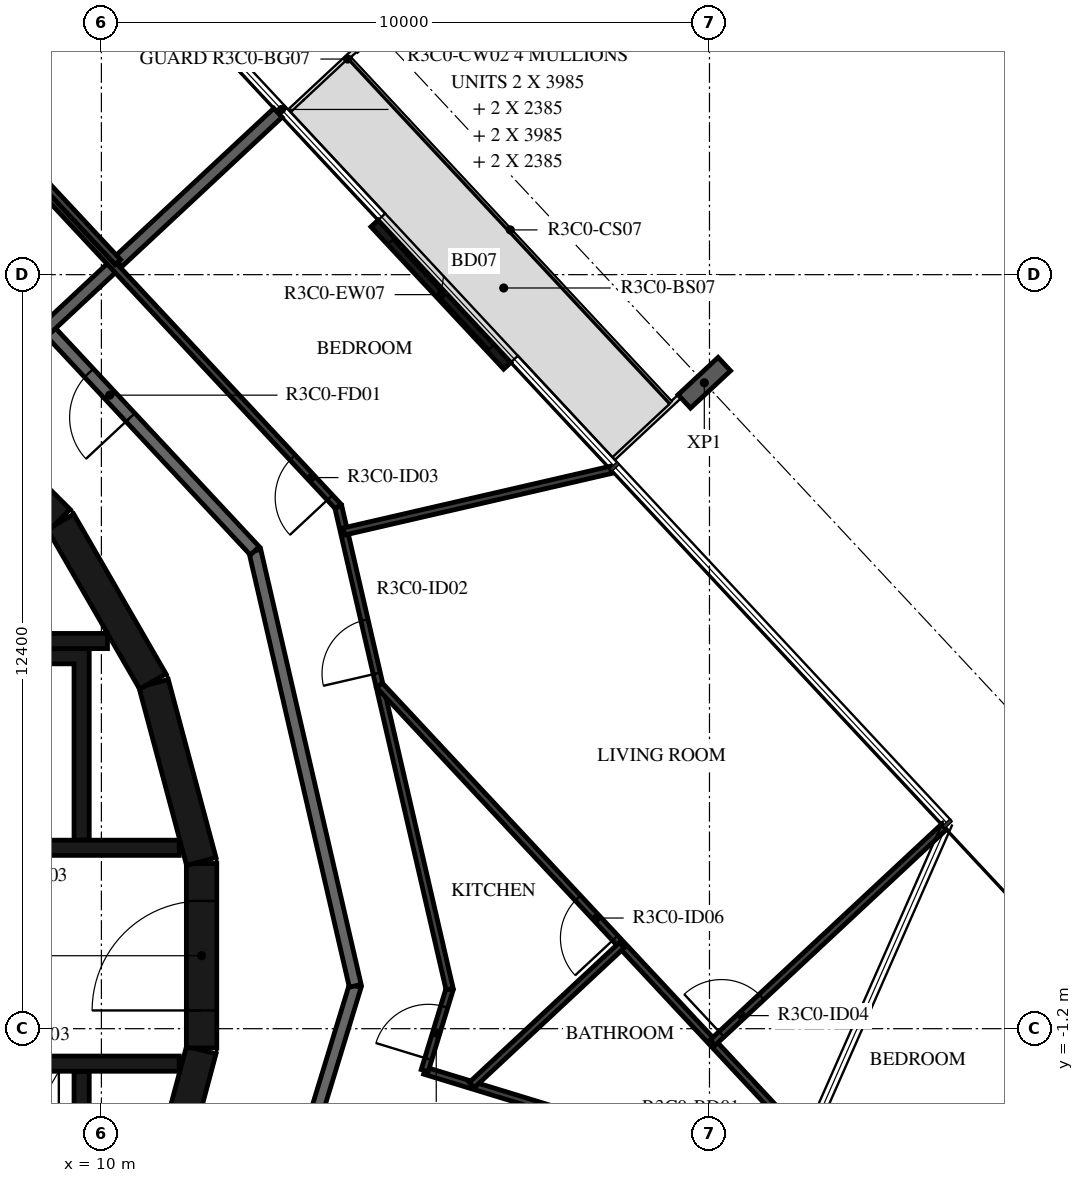
"""IFC4 building model, lengths in metres.
Left out: names, types, materials, properties, quantities, classifications, styles, units other than length and angle.
Written with IfcOpenShell. Run it as: python <this file> out.ifc"""

import sys

from ifc_helpers import new_model, si_unit, direction, frame, frame_2d, origin, origin_2d, place, context, subcontext, project, spatial, polyline, rectangle, i_section, outline, extrude, element, fill, save


model = new_model("IFC4")
c1 = context("Model", 3, precision=1e-05, world=origin(), true_north=direction((0.0, 1.0)))
c2 = subcontext(c1, "Body", "Model", "MODEL_VIEW")
j1 = project(units=[si_unit("LENGTHUNIT", "METRE"), si_unit("PLANEANGLEUNIT", "RADIAN")], contexts=[c1])
p1 = place(None, origin())
s1 = spatial("IfcSite", under=j1, at=p1, CompositionType="ELEMENT")
p2 = place(p1, origin())
s2 = spatial("IfcBuilding", under=s1, at=p2, CompositionType="ELEMENT")
p3 = place(p2, frame((0.0, 0.0, 141.4)))
s3 = spatial("IfcBuildingStorey", under=s2, at=p3, CompositionType="ELEMENT", Elevation=141.4)
p4 = place(p3, frame((19.915, 9.422, -0.38), z_axis=(0.0, 0.0, 1.0), x_axis=(0.68199801865, -0.731354019992, 0.0)))
e1 = element("IfcColumn", 1, at=p4, inside=s3, PredefinedType="COLUMN", context=c2, shape_type="SweptSolid", body=[
    extrude(i_section(OverallWidth=0.3, OverallDepth=0.9, WebThickness=0.019, FlangeThickness=0.035, FilletRadius=0.03, at=origin_2d()), origin(), (0.0, 0.0, 1.0), 2.616),
])
p5 = place(p3, frame((16.674, 9.701, 0.0), z_axis=(0.0, 0.0, 1.0), x_axis=(-0.681994703002, 0.731357111866, 0.0)))
e2 = element("IfcWall", 2, at=p5, inside=s3, PredefinedType="STANDARD", context=c2, shape_type="SweptSolid", body=[
    extrude(rectangle(XDim=3.2, YDim=0.16, at=frame_2d((1.6, 0.0))), origin(), (0.0, 0.0, 1.0), 3.05),
])
p6 = place(p5, frame((0.4, 0.0, 0.0)))
e3 = element("IfcOpeningElement", 3, at=p6, cuts=e2, PredefinedType="OPENING", context=c2, shape_type="SweptSolid", body=[
    extrude(rectangle(XDim=2.4, YDim=2.4, at=frame_2d((1.2, 1.2))), frame((0.0, 0.09, 0.0), z_axis=(0.0, -1.0, 0.0), x_axis=(1.0, 0.0, 0.0)), (0.0, 0.0, 1.0), 0.18),
])
p7 = place(p3, frame((10.858, -4.479, 0.0), z_axis=(0.0, 0.0, 1.0), x_axis=(0.258734743916, 0.965948410781, 0.0)))
e4 = element("IfcWall", 4, at=p7, inside=s3, PredefinedType="SHEAR", context=c2, shape_type="SweptSolid", body=[
    extrude(rectangle(XDim=3.033, YDim=0.5, at=frame_2d((1.516, 0.0))), origin(), (0.0, 0.0, 1.0), 3.05),
])
p8 = place(p3, frame((11.647, -1.516, 0.0), z_axis=(0.0, 0.0, 1.0), x_axis=(0.0, 1.0, 0.0)))
e5 = element("IfcWall", 5, at=p8, inside=s3, PredefinedType="SHEAR", context=c2, shape_type="SweptSolid", body=[
    extrude(rectangle(XDim=3.033, YDim=0.5, at=frame_2d((1.516, 0.0))), origin(), (0.0, 0.0, 1.0), 3.05),
])
p9 = place(p8, frame((0.616, 0.0, 0.0)))
e6 = element("IfcOpeningElement", 6, at=p9, cuts=e5, PredefinedType="OPENING", context=c2, shape_type="SweptSolid", body=[
    extrude(rectangle(XDim=1.8, YDim=2.1, at=frame_2d((0.9, 1.05))), frame((0.0, 0.26, 0.0), z_axis=(0.0, -1.0, 0.0), x_axis=(1.0, 0.0, 0.0)), (0.0, 0.0, 1.0), 0.52),
])
for number, where, z_axis, x_axis in (
    (7, (11.643, 1.55, 0.0), (0.0, 0.0, 1.0), (-0.259, 0.966, 0.0)),
    (8, (10.845, 4.51, 0.0), (0.0, 0.0, 1.0), (-0.5, 0.866, 0.0)),
):
    element("IfcWall", number, at=place(p3, frame(where, z_axis=z_axis, x_axis=x_axis)), inside=s3, PredefinedType="SHEAR", context=c2, shape_type="SweptSolid", body=[
        extrude(rectangle(XDim=3.033, YDim=0.5, at=frame_2d((1.516, 0.0))), origin(), (0.0, 0.0, 1.0), 3.05),
    ])
p10 = place(p3, frame((9.308, 7.164, 0.0), z_axis=(0.0, 0.0, 1.0), x_axis=(-0.707106781187, 0.707106781187, 0.0)))
e9 = element("IfcWall", 9, at=p10, inside=s3, PredefinedType="SHEAR", context=c2, shape_type="SweptSolid", body=[
    extrude(rectangle(XDim=3.032, YDim=0.5, at=frame_2d((1.516, 0.0))), origin(), (0.0, 0.0, 1.0), 3.05),
])
p11 = place(p10, frame((0.416, 0.0, 0.0)))
e10 = element("IfcOpeningElement", 10, at=p11, cuts=e9, PredefinedType="OPENING", context=c2, shape_type="SweptSolid", body=[
    extrude(rectangle(XDim=1.2, YDim=2.1, at=frame_2d((0.6, 1.05))), frame((0.0, 0.26, 0.0), z_axis=(0.0, -1.0, 0.0), x_axis=(1.0, 0.0, 0.0)), (0.0, 0.0, 1.0), 0.52),
])
p12 = place(p3, frame((7.0, 5.175, 0.0), z_axis=(0.0, 0.0, 1.0), x_axis=(1.0, 0.0, 0.0)))
e11 = element("IfcWall", 11, at=p12, inside=s3, PredefinedType="SHEAR", context=c2, shape_type="SweptSolid", body=[
    extrude(rectangle(XDim=3.1, YDim=0.25, at=frame_2d((1.55, 0.0))), origin(), (0.0, 0.0, 1.0), 3.05),
])
p13 = place(p3, origin())
e12 = element("IfcWall", 12, at=p13, inside=s3, PredefinedType="SHEAR", context=c2, shape_type="SweptSolid", body=[
    extrude(outline(polyline([(-9.55, 4.8), (-7.65, 4.8), (-7.65, 1.9), (-7.4, 1.9), (-7.4, 4.8), (-5.5, 4.8), (-5.5, 1.9), (-5.25, 1.9), (-5.25, 4.8), (-3.35, 4.8), (-3.35, 1.9), (-3.1, 1.9), (-3.1, 4.8), (-1.2, 4.8), (-1.2, 1.9), (-0.95, 1.9), (-0.95, 4.8), (0.95, 4.8), (0.95, 1.9), (1.2, 1.9), (1.2, 4.8), (3.1, 4.8), (3.1, 1.9), (3.35, 1.9), (3.35, 4.8), (5.25, 4.8), (5.25, 1.9), (5.5, 1.9), (5.5, 4.8), (7.4, 4.8), (7.4, 1.9), (7.65, 1.9), (7.65, 4.8), (9.55, 4.8), (9.55, 1.9), (9.8, 1.9), (9.8, 4.8), (9.8, 5.05), (-9.8, 5.05), (-9.8, 4.8), (-9.8, 1.9), (-9.55, 1.9), (-9.55, 4.8)])), origin(), (0.0, 0.0, 1.0), 3.05),
])
p14 = place(p3, origin())
e13 = element("IfcWall", 13, at=p14, inside=s3, PredefinedType="SHEAR", context=c2, shape_type="SweptSolid", body=[
    extrude(outline(polyline([(9.8, -5.05), (9.8, -4.8), (9.8, -1.9), (9.55, -1.9), (9.55, -4.8), (7.65, -4.8), (7.65, -1.9), (7.4, -1.9), (7.4, -4.8), (5.5, -4.8), (5.5, -1.9), (5.25, -1.9), (5.25, -4.8), (3.35, -4.8), (3.35, -1.9), (3.1, -1.9), (3.1, -4.8), (-5.25, -4.8), (-5.25, -1.9), (-5.5, -1.9), (-5.5, -4.8), (-7.4, -4.8), (-7.4, -1.9), (-7.65, -1.9), (-7.65, -4.8), (-9.55, -4.8), (-9.55, -1.9), (-9.8, -1.9), (-9.8, -4.8), (-9.8, -5.05), (9.8, -5.05)])), origin(), (0.0, 0.0, 1.0), 3.05),
])
p15 = place(p3, frame((3.35, 1.775, 0.0), z_axis=(0.0, 0.0, 1.0), x_axis=(1.0, 0.0, 0.0)))
e14 = element("IfcWall", 14, at=p15, inside=s3, PredefinedType="SHEAR", context=c2, shape_type="SweptSolid", body=[
    extrude(rectangle(XDim=7.93, YDim=0.25, at=frame_2d((3.965, 0.0))), origin(), (0.0, 0.0, 1.0), 3.05),
])
p16 = place(p15, frame((0.35, 0.0, 0.0)))
e15 = element("IfcOpeningElement", 15, at=p16, cuts=e14, PredefinedType="OPENING", context=c2, shape_type="SweptSolid", body=[
    extrude(rectangle(XDim=1.2, YDim=2.4, at=frame_2d((0.6, 1.2))), frame((0.0, 0.135, 0.0), z_axis=(0.0, -1.0, 0.0), x_axis=(1.0, 0.0, 0.0)), (0.0, 0.0, 1.0), 0.27),
])
p17 = place(p15, frame((2.5, 0.0, 0.0)))
e16 = element("IfcOpeningElement", 16, at=p17, cuts=e14, PredefinedType="OPENING", context=c2, shape_type="SweptSolid", body=[
    extrude(rectangle(XDim=1.2, YDim=2.4, at=frame_2d((0.6, 1.2))), frame((0.0, 0.135, 0.0), z_axis=(0.0, -1.0, 0.0), x_axis=(1.0, 0.0, 0.0)), (0.0, 0.0, 1.0), 0.27),
])
p18 = place(p15, frame((4.8, 0.0, 0.0)))
e17 = element("IfcOpeningElement", 17, at=p18, cuts=e14, PredefinedType="OPENING", context=c2, shape_type="SweptSolid", body=[
    extrude(rectangle(XDim=0.9, YDim=2.1, at=frame_2d((0.45, 1.05))), frame((0.0, 0.135, 0.0), z_axis=(0.0, -1.0, 0.0), x_axis=(1.0, 0.0, 0.0)), (0.0, 0.0, 1.0), 0.27),
])
p19 = place(p3, frame((3.35, -1.775, 0.0), z_axis=(0.0, 0.0, 1.0), x_axis=(1.0, 0.0, 0.0)))
e18 = element("IfcWall", 18, at=p19, inside=s3, PredefinedType="SHEAR", context=c2, shape_type="SweptSolid", body=[
    extrude(rectangle(XDim=7.93, YDim=0.25, at=frame_2d((3.965, 0.0))), origin(), (0.0, 0.0, 1.0), 3.05),
])
p20 = place(p19, frame((0.4, 0.0, 0.0)))
e19 = element("IfcOpeningElement", 19, at=p20, cuts=e18, PredefinedType="OPENING", context=c2, shape_type="SweptSolid", body=[
    extrude(rectangle(XDim=1.1, YDim=2.4, at=frame_2d((0.55, 1.2))), frame((0.0, 0.135, 0.0), z_axis=(0.0, -1.0, 0.0), x_axis=(1.0, 0.0, 0.0)), (0.0, 0.0, 1.0), 0.27),
])
p21 = place(p19, frame((2.55, 0.0, 0.0)))
e20 = element("IfcOpeningElement", 20, at=p21, cuts=e18, PredefinedType="OPENING", context=c2, shape_type="SweptSolid", body=[
    extrude(rectangle(XDim=1.1, YDim=2.4, at=frame_2d((0.55, 1.2))), frame((0.0, 0.135, 0.0), z_axis=(0.0, -1.0, 0.0), x_axis=(1.0, 0.0, 0.0)), (0.0, 0.0, 1.0), 0.27),
])
p22 = place(p19, frame((4.7, 0.0, 0.0)))
e21 = element("IfcOpeningElement", 21, at=p22, cuts=e18, PredefinedType="OPENING", context=c2, shape_type="SweptSolid", body=[
    extrude(rectangle(XDim=1.1, YDim=2.4, at=frame_2d((0.55, 1.2))), frame((0.0, 0.135, 0.0), z_axis=(0.0, -1.0, 0.0), x_axis=(1.0, 0.0, 0.0)), (0.0, 0.0, 1.0), 0.27),
])
p23 = place(p3, frame((12.028, -7.516, 0.0), z_axis=(0.0, 0.0, 1.0), x_axis=(0.292365533182, 0.956306642771, 0.0)))
e22 = element("IfcWall", 22, at=p23, inside=s3, PredefinedType="STANDARD", context=c2, shape_type="SweptSolid", body=[
    extrude(rectangle(XDim=7.342, YDim=0.2, at=frame_2d((3.671, 0.0))), origin(), (0.0, 0.0, 1.0), 3.05),
])
p24 = place(p3, frame((14.175, -0.495, 0.0), z_axis=(0.0, 0.0, 1.0), x_axis=(-0.224922649383, 0.974376622151, 0.0)))
e23 = element("IfcWall", 23, at=p24, inside=s3, PredefinedType="STANDARD", context=c2, shape_type="SweptSolid", body=[
    extrude(rectangle(XDim=7.342, YDim=0.2, at=frame_2d((3.671, 0.0))), origin(), (0.0, 0.0, 1.0), 3.05),
])
p25 = place(p3, frame((12.523, 6.659, 0.0), z_axis=(0.0, 0.0, 1.0), x_axis=(-0.682001841105, 0.731350455479, 0.0)))
e24 = element("IfcWall", 24, at=p25, inside=s3, PredefinedType="STANDARD", context=c2, shape_type="SweptSolid", body=[
    extrude(rectangle(XDim=7.342, YDim=0.2, at=frame_2d((3.671, 0.0))), origin(), (0.0, 0.0, 1.0), 3.05),
])
p26 = place(p25, frame((3.0, 0.0, 0.0)))
e25 = element("IfcOpeningElement", 25, at=p26, cuts=e24, PredefinedType="OPENING", context=c2, shape_type="SweptSolid", body=[
    extrude(rectangle(XDim=1.0, YDim=2.1, at=frame_2d((0.5, 1.05))), frame((0.0, 0.11, 0.0), z_axis=(0.0, -1.0, 0.0), x_axis=(1.0, 0.0, 0.0)), (0.0, 0.0, 1.0), 0.22),
])
p27 = place(p25, frame((5.209, 0.0, 0.0)))
e26 = element("IfcOpeningElement", 26, at=p27, cuts=e24, PredefinedType="OPENING", context=c2, shape_type="SweptSolid", body=[
    extrude(rectangle(XDim=1.0, YDim=2.1, at=frame_2d((0.5, 1.05))), frame((0.0, 0.11, 0.0), z_axis=(0.0, -1.0, 0.0), x_axis=(1.0, 0.0, 0.0)), (0.0, 0.0, 1.0), 0.22),
])
p28 = place(p3, frame((10.233, 11.372, 0.0), z_axis=(0.0, 0.0, 1.0), x_axis=(-0.731329353292, -0.682024469513, 0.0)))
e27 = element("IfcWall", 27, at=p28, inside=s3, PredefinedType="STANDARD", context=c2, shape_type="SweptSolid", body=[
    extrude(rectangle(XDim=1.54, YDim=0.2, at=frame_2d((0.77, 0.0))), origin(), (0.0, 0.0, 1.0), 3.05),
])
p29 = place(p3, frame((12.903, 13.862, 0.0), z_axis=(0.0, 0.0, 1.0), x_axis=(-0.731328084739, -0.682025829769, 0.0)))
e28 = element("IfcWall", 28, at=p29, inside=s3, PredefinedType="STANDARD", context=c2, shape_type="SweptSolid", body=[
    extrude(rectangle(XDim=3.6, YDim=0.2, at=frame_2d((1.8, 0.0))), origin(), (0.0, 0.0, 1.0), 3.05),
])
p30 = place(p3, frame((23.975, -4.537, 0.0), z_axis=(0.0, 0.0, 1.0), x_axis=(-0.956300480156, 0.292385689892, 0.0)))
e29 = element("IfcWall", 29, at=p30, inside=s3, PredefinedType="PARTITIONING", context=c2, shape_type="SweptSolid", body=[
    extrude(rectangle(XDim=9.054, YDim=0.12, at=frame_2d((4.527, 0.0))), origin(), (0.0, 0.0, 1.0), 3.05),
])
p31 = place(p30, frame((2.998, 0.0, 0.0)))
e30 = element("IfcOpeningElement", 30, at=p31, cuts=e29, PredefinedType="OPENING", context=c2, shape_type="SweptSolid", body=[
    extrude(rectangle(XDim=0.8, YDim=2.1, at=frame_2d((0.4, 1.05))), frame((0.0, 0.07, 0.0), z_axis=(0.0, -1.0, 0.0), x_axis=(1.0, 0.0, 0.0)), (0.0, 0.0, 1.0), 0.14),
])
p32 = place(p3, frame((15.317, -1.89, 0.0), z_axis=(0.0, 0.0, 1.0), x_axis=(0.292360095486, 0.956308305186, 0.0)))
e31 = element("IfcWall", 31, at=p32, inside=s3, PredefinedType="PARTITIONING", context=c2, shape_type="SweptSolid", body=[
    extrude(rectangle(XDim=1.402, YDim=0.12, at=frame_2d((0.701, 0.0))), origin(), (0.0, 0.0, 1.0), 3.05),
])
p33 = place(p32, frame((0.2, 0.0, 0.0)))
e32 = element("IfcOpeningElement", 32, at=p33, cuts=e31, PredefinedType="OPENING", context=c2, shape_type="SweptSolid", body=[
    extrude(rectangle(XDim=0.9, YDim=2.1, at=frame_2d((0.45, 1.05))), frame((0.0, 0.07, 0.0), z_axis=(0.0, -1.0, 0.0), x_axis=(1.0, 0.0, 0.0)), (0.0, 0.0, 1.0), 0.14),
])
p34 = place(p3, frame((15.727, -0.549, 0.0), z_axis=(0.0, 0.0, 1.0), x_axis=(-0.22493611855, 0.974373512864, 0.0)))
e33 = element("IfcWall", 33, at=p34, inside=s3, PredefinedType="PARTITIONING", context=c2, shape_type="SweptSolid", body=[
    extrude(rectangle(XDim=8.146, YDim=0.12, at=frame_2d((4.073, 0.0))), origin(), (0.0, 0.0, 1.0), 3.05),
])
p35 = place(p34, frame((5.327, 0.0, 0.0)))
e34 = element("IfcOpeningElement", 34, at=p35, cuts=e33, PredefinedType="OPENING", context=c2, shape_type="SweptSolid", body=[
    extrude(rectangle(XDim=0.9, YDim=2.1, at=frame_2d((0.45, 1.05))), frame((0.0, 0.07, 0.0), z_axis=(0.0, -1.0, 0.0), x_axis=(1.0, 0.0, 0.0)), (0.0, 0.0, 1.0), 0.14),
])
p36 = place(p3, frame((13.894, 7.388, 0.0), z_axis=(0.0, 0.0, 1.0), x_axis=(-0.681994622729, 0.731357186721, 0.0)))
e35 = element("IfcWall", 35, at=p36, inside=s3, PredefinedType="PARTITIONING", context=c2, shape_type="SweptSolid", body=[
    extrude(rectangle(XDim=8.146, YDim=0.12, at=frame_2d((4.073, 0.0))), origin(), (0.0, 0.0, 1.0), 3.05),
])
p37 = place(p36, frame((0.2, 0.0, 0.0)))
e36 = element("IfcOpeningElement", 36, at=p37, cuts=e35, PredefinedType="OPENING", context=c2, shape_type="SweptSolid", body=[
    extrude(rectangle(XDim=0.9, YDim=2.1, at=frame_2d((0.45, 1.05))), frame((0.0, 0.07, 0.0), z_axis=(0.0, -1.0, 0.0), x_axis=(1.0, 0.0, 0.0)), (0.0, 0.0, 1.0), 0.14),
])
p38 = place(p3, frame((22.543, -4.1, 0.0), z_axis=(0.0, 0.0, 1.0), x_axis=(-0.681980976228, 0.731369911921, 0.0)))
e37 = element("IfcWall", 37, at=p38, inside=s3, PredefinedType="PARTITIONING", context=c2, shape_type="SweptSolid", body=[
    extrude(rectangle(XDim=11.686, YDim=0.12, at=frame_2d((5.843, 0.0))), origin(), (0.0, 0.0, 1.0), 3.05),
])
p39 = place(p38, frame((6.003, 0.0, 0.0)))
e38 = element("IfcOpeningElement", 38, at=p39, cuts=e37, PredefinedType="OPENING", context=c2, shape_type="SweptSolid", body=[
    extrude(rectangle(XDim=0.9, YDim=2.1, at=frame_2d((0.45, 1.05))), frame((0.0, 0.07, 0.0), z_axis=(0.0, -1.0, 0.0), x_axis=(1.0, 0.0, 0.0)), (0.0, 0.0, 1.0), 0.14),
])
p40 = place(p3, frame((16.091, -2.127, 0.0), z_axis=(0.0, 0.0, 1.0), x_axis=(0.731389706697, 0.6819597473, 0.0)))
e39 = element("IfcWall", 39, at=p40, inside=s3, PredefinedType="PARTITIONING", context=c2, shape_type="SweptSolid", body=[
    extrude(rectangle(XDim=3.374, YDim=0.12, at=frame_2d((1.687, 0.0))), origin(), (0.0, 0.0, 1.0), 3.05),
])
p41 = place(p3, frame((18.379, 7.99, 0.0), z_axis=(0.0, 0.0, 1.0), x_axis=(-0.974372926515, -0.224938658471, 0.0)))
e40 = element("IfcWall", 40, at=p41, inside=s3, PredefinedType="PARTITIONING", context=c2, shape_type="SweptSolid", body=[
    extrude(rectangle(XDim=4.505, YDim=0.12, at=frame_2d((2.253, 0.0))), origin(), (0.0, 0.0, 1.0), 3.05),
])
p42 = place(p3, frame((20.052, -1.428, 0.0), z_axis=(0.0, 0.0, 1.0), x_axis=(0.73134872518, 0.682003696601, 0.0)))
e41 = element("IfcWall", 41, at=p42, inside=s3, PredefinedType="PARTITIONING", context=c2, shape_type="SweptSolid", body=[
    extrude(rectangle(XDim=5.2, YDim=0.12, at=frame_2d((2.6, 0.0))), origin(), (0.0, 0.0, 1.0), 3.05),
])
p43 = place(p42, frame((0.2, 0.0, 0.0)))
e42 = element("IfcOpeningElement", 42, at=p43, cuts=e41, PredefinedType="OPENING", context=c2, shape_type="SweptSolid", body=[
    extrude(rectangle(XDim=0.9, YDim=2.1, at=frame_2d((0.45, 1.05))), frame((0.0, 0.07, 0.0), z_axis=(0.0, -1.0, 0.0), x_axis=(1.0, 0.0, 0.0)), (0.0, 0.0, 1.0), 0.14),
])
p44 = place(p3, frame((26.593, -0.818, 0.0), z_axis=(0.0, 0.0, 1.0), x_axis=(-0.575629018128, -0.817710971853, 0.0)))
e43 = element("IfcWall", 43, at=p44, inside=s3, PredefinedType="PARTITIONING", context=c2, shape_type="SweptSolid", body=[
    extrude(rectangle(XDim=4.548, YDim=0.12, at=frame_2d((2.274, 0.0))), origin(), (0.0, 0.0, 1.0), 3.05),
])
p45 = place(p44, frame((0.2, 0.0, 0.0)))
e44 = element("IfcOpeningElement", 44, at=p45, cuts=e43, PredefinedType="OPENING", context=c2, shape_type="SweptSolid", body=[
    extrude(rectangle(XDim=0.9, YDim=2.1, at=frame_2d((0.45, 1.05))), frame((0.0, 0.07, 0.0), z_axis=(0.0, -1.0, 0.0), x_axis=(1.0, 0.0, 0.0)), (0.0, 0.0, 1.0), 0.14),
])
p46 = place(p3, frame((-1.539, 24.071, 0.0), z_axis=(0.0, 0.0, 1.0), x_axis=(0.68200220595, -0.731350115252, 0.0)))
e45 = element("IfcWall", 45, at=p46, inside=s3, PredefinedType="PARTITIONING", context=c2, shape_type="SweptSolid", body=[
    extrude(rectangle(XDim=17.316, YDim=0.12, at=frame_2d((8.658, 0.0))), origin(), (0.0, 0.0, 1.0), 3.05),
])
p47 = place(p46, frame((3.323, 0.0, 0.0)))
e46 = element("IfcOpeningElement", 46, at=p47, cuts=e45, PredefinedType="OPENING", context=c2, shape_type="SweptSolid", body=[
    extrude(rectangle(XDim=0.9, YDim=2.1, at=frame_2d((0.45, 1.05))), frame((0.0, 0.07, 0.0), z_axis=(0.0, -1.0, 0.0), x_axis=(1.0, 0.0, 0.0)), (0.0, 0.0, 1.0), 0.14),
])
p48 = place(p46, frame((0.2, 0.0, 0.0)))
e47 = element("IfcOpeningElement", 47, at=p48, cuts=e45, PredefinedType="OPENING", context=c2, shape_type="SweptSolid", body=[
    extrude(rectangle(XDim=0.9, YDim=2.1, at=frame_2d((0.45, 1.05))), frame((0.0, 0.07, 0.0), z_axis=(0.0, -1.0, 0.0), x_axis=(1.0, 0.0, 0.0)), (0.0, 0.0, 1.0), 0.14),
])
p49 = place(p6, origin())
e48 = element("IfcDoor", 48, at=p49, inside=s3, OperationType="DOUBLE_DOOR_SLIDING", PredefinedType="DOOR", context=c2, shape_type="SweptSolid", body=[
    extrude(rectangle(XDim=2.4, YDim=2.4, at=frame_2d((1.2, 1.2))), frame((0.0, 0.025, 0.0), z_axis=(0.0, -1.0, 0.0), x_axis=(1.0, 0.0, 0.0)), (0.0, 0.0, 1.0), 0.05),
])
fill(e3, e48)
p50 = place(p9, origin())
e49 = element("IfcDoor", 49, at=p50, inside=s3, OperationType="DOUBLE_DOOR_SINGLE_SWING", PredefinedType="DOOR", context=c2, shape_type="SweptSolid", body=[
    extrude(rectangle(XDim=1.8, YDim=2.1, at=frame_2d((0.9, 1.05))), frame((0.0, 0.025, 0.0), z_axis=(0.0, -1.0, 0.0), x_axis=(1.0, 0.0, 0.0)), (0.0, 0.0, 1.0), 0.05),
])
fill(e6, e49)
p51 = place(p26, origin())
e50 = element("IfcDoor", 50, at=p51, inside=s3, OperationType="SINGLE_SWING_LEFT", PredefinedType="DOOR", context=c2, shape_type="SweptSolid", body=[
    extrude(rectangle(XDim=1.0, YDim=2.1, at=frame_2d((0.5, 1.05))), frame((0.0, 0.025, 0.0), z_axis=(0.0, -1.0, 0.0), x_axis=(1.0, 0.0, 0.0)), (0.0, 0.0, 1.0), 0.05),
])
fill(e25, e50)
p52 = place(p33, origin())
e51 = element("IfcDoor", 51, at=p52, inside=s3, OperationType="SINGLE_SWING_LEFT", PredefinedType="DOOR", context=c2, shape_type="SweptSolid", body=[
    extrude(rectangle(XDim=0.9, YDim=2.1, at=frame_2d((0.45, 1.05))), frame((0.0, 0.025, 0.0), z_axis=(0.0, -1.0, 0.0), x_axis=(1.0, 0.0, 0.0)), (0.0, 0.0, 1.0), 0.05),
])
fill(e32, e51)
p53 = place(p35, origin())
e52 = element("IfcDoor", 52, at=p53, inside=s3, OperationType="SINGLE_SWING_LEFT", PredefinedType="DOOR", context=c2, shape_type="SweptSolid", body=[
    extrude(rectangle(XDim=0.9, YDim=2.1, at=frame_2d((0.45, 1.05))), frame((0.0, 0.025, 0.0), z_axis=(0.0, -1.0, 0.0), x_axis=(1.0, 0.0, 0.0)), (0.0, 0.0, 1.0), 0.05),
])
fill(e34, e52)
p54 = place(p37, origin())
e53 = element("IfcDoor", 53, at=p54, inside=s3, OperationType="SINGLE_SWING_LEFT", PredefinedType="DOOR", context=c2, shape_type="SweptSolid", body=[
    extrude(rectangle(XDim=0.9, YDim=2.1, at=frame_2d((0.45, 1.05))), frame((0.0, 0.025, 0.0), z_axis=(0.0, -1.0, 0.0), x_axis=(1.0, 0.0, 0.0)), (0.0, 0.0, 1.0), 0.05),
])
fill(e36, e53)
p55 = place(p43, origin())
e54 = element("IfcDoor", 54, at=p55, inside=s3, OperationType="SINGLE_SWING_LEFT", PredefinedType="DOOR", context=c2, shape_type="SweptSolid", body=[
    extrude(rectangle(XDim=0.9, YDim=2.1, at=frame_2d((0.45, 1.05))), frame((0.0, 0.025, 0.0), z_axis=(0.0, -1.0, 0.0), x_axis=(1.0, 0.0, 0.0)), (0.0, 0.0, 1.0), 0.05),
])
fill(e42, e54)
p56 = place(p39, origin())
e55 = element("IfcDoor", 55, at=p56, inside=s3, OperationType="SINGLE_SWING_RIGHT", PredefinedType="DOOR", context=c2, shape_type="SweptSolid", body=[
    extrude(rectangle(XDim=0.9, YDim=2.1, at=frame_2d((0.45, 1.05))), frame((0.0, 0.025, 0.0), z_axis=(0.0, -1.0, 0.0), x_axis=(1.0, 0.0, 0.0)), (0.0, 0.0, 1.0), 0.05),
])
fill(e38, e55)
save(model, sys.argv[1])
